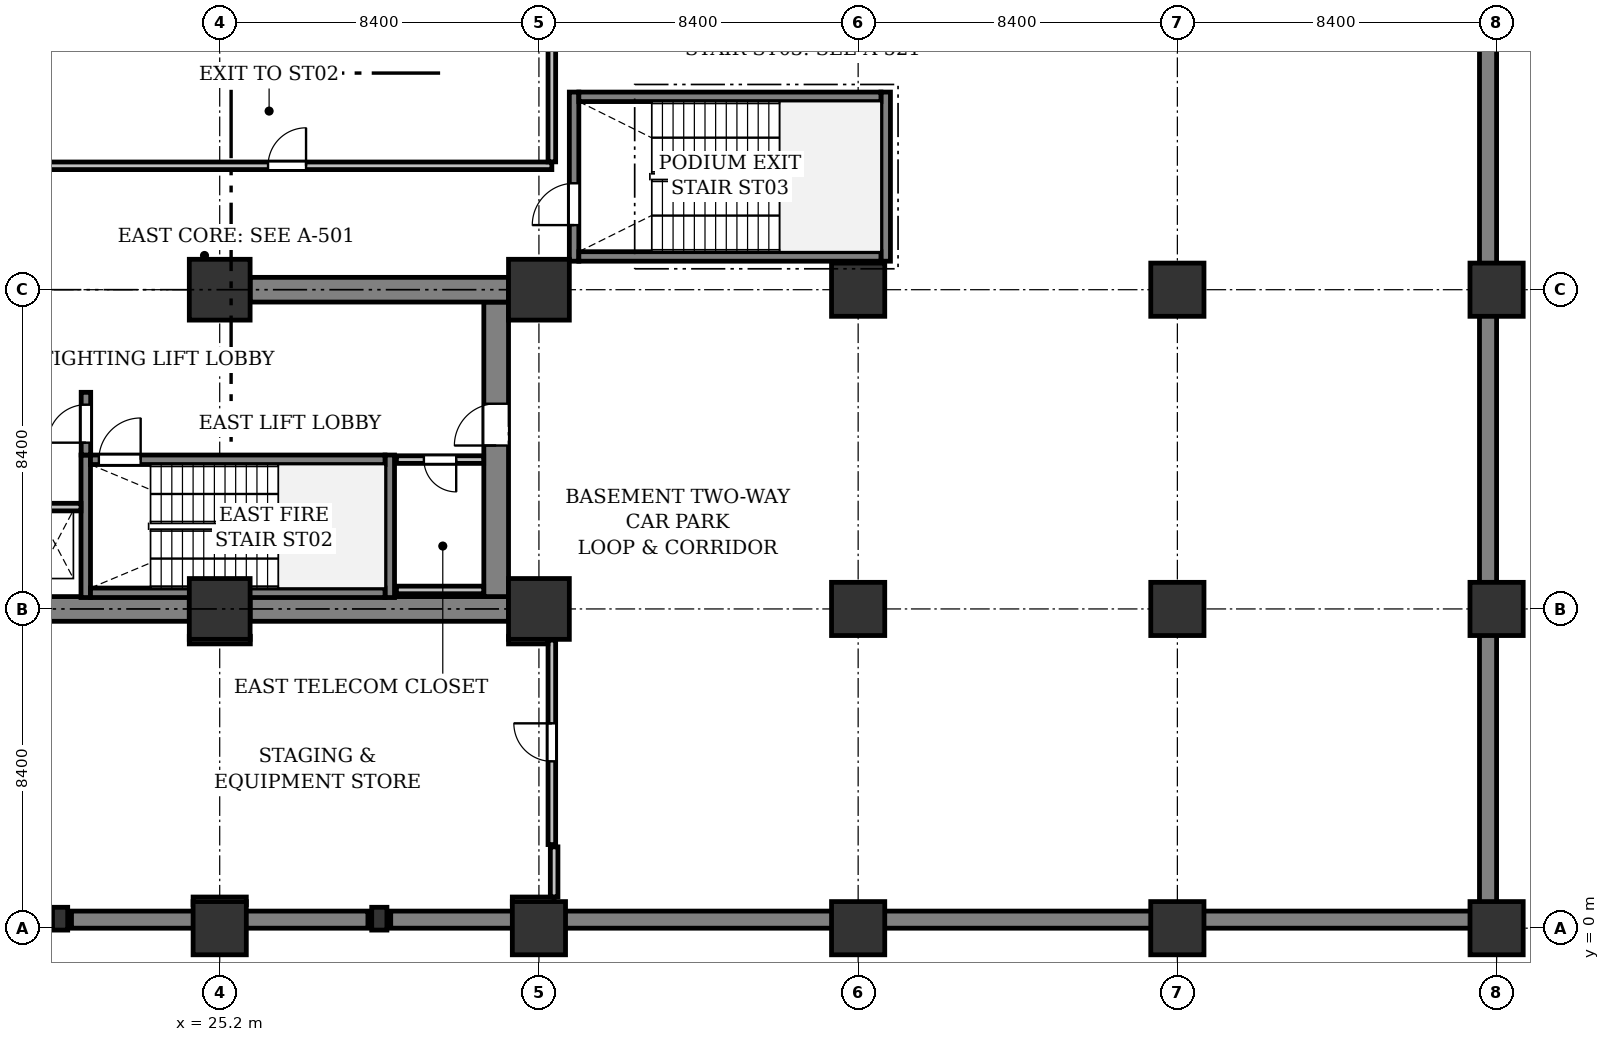
"""IFC4 building model, lengths in metres.
Left out: names, types, materials, properties, quantities, classifications, styles, units other than length and angle.
Written with IfcOpenShell. Run it as: python <this file> out.ifc"""

import sys

from ifc_helpers import new_model, si_unit, direction, frame, frame_2d, origin, origin_2d, place, context, subcontext, project, spatial, rectangle, extrude, element, fill, save


model = new_model("IFC4")
c1 = context("Model", 3, precision=1e-05, world=origin(), true_north=direction((0.0, 1.0)))
c2 = subcontext(c1, "Body", "Model", "MODEL_VIEW")
j1 = project(units=[si_unit("LENGTHUNIT", "METRE"), si_unit("PLANEANGLEUNIT", "RADIAN")], contexts=[c1])
p1 = place(None, origin())
s1 = spatial("IfcSite", under=j1, at=p1, CompositionType="ELEMENT")
p2 = place(p1, origin())
s2 = spatial("IfcBuilding", under=s1, at=p2, CompositionType="ELEMENT")
p3 = place(p2, frame((0.0, 0.0, -9.6)))
s3 = spatial("IfcBuildingStorey", under=s2, at=p3, CompositionType="ELEMENT", Elevation=-9.6)
p4 = place(p3, frame((21.3, 0.225, 0.0), z_axis=(0.0, 0.0, 1.0), x_axis=(1.0, 0.0, 0.0)))
e1 = element("IfcWall", 1, at=p4, inside=s3, PredefinedType="SOLIDWALL", context=c2, shape_type="SweptSolid", body=[
    extrude(rectangle(XDim=7.8, YDim=0.45, at=frame_2d((3.9, 0.0))), origin(), (0.0, 0.0, 1.0), 4.48),
])
p5 = place(p3, frame((29.7, 0.225, 0.0), z_axis=(0.0, 0.0, 1.0), x_axis=(1.0, 0.0, 0.0)))
e2 = element("IfcWall", 2, at=p5, inside=s3, PredefinedType="SOLIDWALL", context=c2, shape_type="SweptSolid", body=[
    extrude(rectangle(XDim=29.1, YDim=0.45, at=frame_2d((14.55, 0.0))), origin(), (0.0, 0.0, 1.0), 4.48),
])
p6 = place(p3, frame((58.575, 0.45, 0.0), z_axis=(0.0, 0.0, 1.0), x_axis=(0.0, 1.0, 0.0)))
e3 = element("IfcWall", 3, at=p6, inside=s3, PredefinedType="SOLIDWALL", context=c2, shape_type="SweptSolid", body=[
    extrude(rectangle(XDim=49.5, YDim=0.45, at=frame_2d((24.75, 0.0))), origin(), (0.0, 0.0, 1.0), 4.48),
])
p7 = place(p3, frame((25.2, 0.0, 0.0), z_axis=(0.0, 0.0, 1.0), x_axis=(1.0, 0.0, 0.0)))
e4 = element("IfcColumn", 4, at=p7, inside=s3, PredefinedType="COLUMN", context=c2, shape_type="SweptSolid", body=[
    extrude(rectangle(XDim=1.4, YDim=1.4, at=origin_2d()), origin(), (0.0, 0.0, 1.0), 4.8),
])
for number, where, z_axis, x_axis in (
    (5, (25.2, 8.4, 0.0), (0.0, 0.0, 1.0), (1.0, 0.0, 0.0)),
    (6, (25.2, 16.8, 0.0), (0.0, 0.0, 1.0), (1.0, 0.0, 0.0)),
):
    element("IfcColumn", number, at=place(p3, frame(where, z_axis=z_axis, x_axis=x_axis)), inside=s3, PredefinedType="COLUMN", context=c2, shape_type="SweptSolid", body=[
        extrude(rectangle(XDim=1.6, YDim=1.6, at=origin_2d()), origin(), (0.0, 0.0, 1.0), 4.8),
    ])
p8 = place(p3, frame((33.6, 0.0, 0.0), z_axis=(0.0, 0.0, 1.0), x_axis=(1.0, 0.0, 0.0)))
e7 = element("IfcColumn", 7, at=p8, inside=s3, PredefinedType="COLUMN", context=c2, shape_type="SweptSolid", body=[
    extrude(rectangle(XDim=1.4, YDim=1.4, at=origin_2d()), origin(), (0.0, 0.0, 1.0), 4.8),
])
for number, where, z_axis, x_axis in (
    (8, (33.6, 8.4, 0.0), (0.0, 0.0, 1.0), (1.0, 0.0, 0.0)),
    (9, (33.6, 16.8, 0.0), (0.0, 0.0, 1.0), (1.0, 0.0, 0.0)),
):
    element("IfcColumn", number, at=place(p3, frame(where, z_axis=z_axis, x_axis=x_axis)), inside=s3, PredefinedType="COLUMN", context=c2, shape_type="SweptSolid", body=[
        extrude(rectangle(XDim=1.6, YDim=1.6, at=origin_2d()), origin(), (0.0, 0.0, 1.0), 4.8),
    ])
for number, where, z_axis, x_axis in (
    (10, (42.0, 0.0, 0.0), (0.0, 0.0, 1.0), (1.0, 0.0, 0.0)),
    (11, (42.0, 8.4, 0.0), (0.0, 0.0, 1.0), (1.0, 0.0, 0.0)),
    (12, (42.0, 16.8, 0.0), (0.0, 0.0, 1.0), (1.0, 0.0, 0.0)),
    (13, (50.4, 0.0, 0.0), (0.0, 0.0, 1.0), (1.0, 0.0, 0.0)),
    (14, (50.4, 8.4, 0.0), (0.0, 0.0, 1.0), (1.0, 0.0, 0.0)),
    (15, (50.4, 16.8, 0.0), (0.0, 0.0, 1.0), (1.0, 0.0, 0.0)),
    (16, (58.8, 0.0, 0.0), (0.0, 0.0, 1.0), (1.0, 0.0, 0.0)),
    (17, (58.8, 8.4, 0.0), (0.0, 0.0, 1.0), (1.0, 0.0, 0.0)),
    (18, (58.8, 16.8, 0.0), (0.0, 0.0, 1.0), (1.0, 0.0, 0.0)),
):
    element("IfcColumn", number, at=place(p3, frame(where, z_axis=z_axis, x_axis=x_axis)), inside=s3, PredefinedType="COLUMN", context=c2, shape_type="SweptSolid", body=[
        extrude(rectangle(XDim=1.4, YDim=1.4, at=origin_2d()), origin(), (0.0, 0.0, 1.0), 4.8),
    ])
for number, where, z_axis, x_axis in (
    (19, (21.0, 0.25, 0.0), (0.0, 0.0, 1.0), (1.0, 0.0, 0.0)),
    (20, (29.4, 0.25, 0.0), (0.0, 0.0, 1.0), (1.0, 0.0, 0.0)),
):
    element("IfcColumn", number, at=place(p3, frame(where, z_axis=z_axis, x_axis=x_axis)), inside=s3, PredefinedType="PILASTER", context=c2, shape_type="SweptSolid", body=[
        extrude(rectangle(XDim=0.4, YDim=0.6, at=origin_2d()), origin(), (0.0, 0.0, 1.0), 4.8),
    ])
p9 = place(p3, frame((17.6, 8.4, 0.0), z_axis=(0.0, 0.0, 1.0), x_axis=(1.0, 0.0, 0.0)))
e21 = element("IfcWall", 21, at=p9, inside=s3, PredefinedType="SHEAR", context=c2, shape_type="SweptSolid", body=[
    extrude(rectangle(XDim=6.8, YDim=0.65, at=frame_2d((3.4, 0.0))), origin(), (0.0, 0.0, 1.0), 4.48),
])
p10 = place(p3, frame((26.0, 8.4, 0.0), z_axis=(0.0, 0.0, 1.0), x_axis=(1.0, 0.0, 0.0)))
e22 = element("IfcWall", 22, at=p10, inside=s3, PredefinedType="SHEAR", context=c2, shape_type="SweptSolid", body=[
    extrude(rectangle(XDim=6.8, YDim=0.65, at=frame_2d((3.4, 0.0))), origin(), (0.0, 0.0, 1.0), 4.48),
])
p11 = place(p3, frame((32.475, 8.725, 0.0), z_axis=(0.0, 0.0, 1.0), x_axis=(0.0, 1.0, 0.0)))
e23 = element("IfcWall", 23, at=p11, inside=s3, PredefinedType="SHEAR", context=c2, shape_type="SweptSolid", body=[
    extrude(rectangle(XDim=7.75, YDim=0.65, at=frame_2d((3.875, 0.0))), origin(), (0.0, 0.0, 1.0), 4.48),
])
p12 = place(p11, frame((3.975, 0.0, 0.0)))
e24 = element("IfcOpeningElement", 24, at=p12, cuts=e23, PredefinedType="OPENING", context=c2, shape_type="SweptSolid", body=[
    extrude(rectangle(XDim=1.1, YDim=2.15, at=frame_2d((0.55, 1.075))), frame((0.0, 0.335, 0.0), z_axis=(0.0, -1.0, 0.0), x_axis=(1.0, 0.0, 0.0)), (0.0, 0.0, 1.0), 0.67),
])
p13 = place(p3, frame((26.0, 16.8, 0.0), z_axis=(0.0, 0.0, 1.0), x_axis=(1.0, 0.0, 0.0)))
e25 = element("IfcWall", 25, at=p13, inside=s3, PredefinedType="SHEAR", context=c2, shape_type="SweptSolid", body=[
    extrude(rectangle(XDim=6.8, YDim=0.65, at=frame_2d((3.4, 0.0))), origin(), (0.0, 0.0, 1.0), 4.48),
])
for number, where, z_axis, x_axis in (
    (26, (21.675, 8.7, 0.0), (0.0, 0.0, 1.0), (0.0, 1.0, 0.0)),
    (27, (29.675, 8.7, 0.0), (0.0, 0.0, 1.0), (0.0, 1.0, 0.0)),
):
    element("IfcWall", number, at=place(p3, frame(where, z_axis=z_axis, x_axis=x_axis)), inside=s3, PredefinedType="SHEAR", context=c2, shape_type="SweptSolid", body=[
        extrude(rectangle(XDim=3.75, YDim=0.25, at=frame_2d((1.875, 0.0))), origin(), (0.0, 0.0, 1.0), 4.48),
    ])
p14 = place(p3, frame((21.8, 8.825, 0.0), z_axis=(0.0, 0.0, 1.0), x_axis=(1.0, 0.0, 0.0)))
e28 = element("IfcWall", 28, at=p14, inside=s3, PredefinedType="SHEAR", context=c2, shape_type="SweptSolid", body=[
    extrude(rectangle(XDim=7.75, YDim=0.25, at=frame_2d((3.875, 0.0))), origin(), (0.0, 0.0, 1.0), 4.48),
])
p15 = place(p3, frame((21.8, 12.325, 0.0), z_axis=(0.0, 0.0, 1.0), x_axis=(1.0, 0.0, 0.0)))
e29 = element("IfcWall", 29, at=p15, inside=s3, PredefinedType="SHEAR", context=c2, shape_type="SweptSolid", body=[
    extrude(rectangle(XDim=7.75, YDim=0.25, at=frame_2d((3.875, 0.0))), origin(), (0.0, 0.0, 1.0), 4.48),
])
p16 = place(p15, frame((0.22, 0.0, 0.0)))
e30 = element("IfcOpeningElement", 30, at=p16, cuts=e29, PredefinedType="OPENING", context=c2, shape_type="SweptSolid", body=[
    extrude(rectangle(XDim=1.1, YDim=2.15, at=frame_2d((0.55, 1.075))), frame((0.0, 0.135, 0.0), z_axis=(0.0, -1.0, 0.0), x_axis=(1.0, 0.0, 0.0)), (0.0, 0.0, 1.0), 0.27),
])
p17 = place(p3, frame((34.525, 17.55, 0.0), z_axis=(0.0, 0.0, 1.0), x_axis=(0.0, 1.0, 0.0)))
e31 = element("IfcWall", 31, at=p17, inside=s3, PredefinedType="SHEAR", context=c2, shape_type="SweptSolid", body=[
    extrude(rectangle(XDim=4.45, YDim=0.25, at=frame_2d((2.225, 0.0))), origin(), (0.0, 0.0, 1.0), 4.48),
])
p18 = place(p17, frame((0.95, 0.0, 0.0)))
e32 = element("IfcOpeningElement", 32, at=p18, cuts=e31, PredefinedType="OPENING", context=c2, shape_type="SweptSolid", body=[
    extrude(rectangle(XDim=1.1, YDim=2.15, at=frame_2d((0.55, 1.075))), frame((0.0, 0.135, 0.0), z_axis=(0.0, -1.0, 0.0), x_axis=(1.0, 0.0, 0.0)), (0.0, 0.0, 1.0), 0.27),
])
p19 = place(p3, frame((42.725, 17.55, 0.0), z_axis=(0.0, 0.0, 1.0), x_axis=(0.0, 1.0, 0.0)))
e33 = element("IfcWall", 33, at=p19, inside=s3, PredefinedType="SHEAR", context=c2, shape_type="SweptSolid", body=[
    extrude(rectangle(XDim=4.45, YDim=0.25, at=frame_2d((2.225, 0.0))), origin(), (0.0, 0.0, 1.0), 4.48),
])
for number, where, z_axis, x_axis in (
    (34, (34.65, 17.675, 0.0), (0.0, 0.0, 1.0), (1.0, 0.0, 0.0)),
    (35, (34.65, 21.875, 0.0), (0.0, 0.0, 1.0), (1.0, 0.0, 0.0)),
):
    element("IfcWall", number, at=place(p3, frame(where, z_axis=z_axis, x_axis=x_axis)), inside=s3, PredefinedType="SHEAR", context=c2, shape_type="SweptSolid", body=[
        extrude(rectangle(XDim=7.95, YDim=0.25, at=frame_2d((3.975, 0.0))), origin(), (0.0, 0.0, 1.0), 4.48),
    ])
p20 = place(p3, frame((20.2, 11.08, 0.0), z_axis=(0.0, 0.0, 1.0), x_axis=(1.0, 0.0, 0.0)))
e36 = element("IfcWall", 36, at=p20, inside=s3, PredefinedType="PARTITIONING", context=c2, shape_type="SweptSolid", body=[
    extrude(rectangle(XDim=1.35, YDim=0.2, at=frame_2d((0.675, 0.0))), origin(), (0.0, 0.0, 1.0), 4.48),
])
p21 = place(p3, frame((21.68, 12.45, 0.0), z_axis=(0.0, 0.0, 1.0), x_axis=(0.0, 1.0, 0.0)))
e37 = element("IfcWall", 37, at=p21, inside=s3, PredefinedType="SHEAR", context=c2, shape_type="SweptSolid", body=[
    extrude(rectangle(XDim=1.65, YDim=0.25, at=frame_2d((0.825, 0.0))), origin(), (0.0, 0.0, 1.0), 4.48),
])
p22 = place(p21, frame((0.325, 0.0, 0.0)))
e38 = element("IfcOpeningElement", 38, at=p22, cuts=e37, PredefinedType="OPENING", context=c2, shape_type="SweptSolid", body=[
    extrude(rectangle(XDim=1.0, YDim=2.15, at=frame_2d((0.5, 1.075))), frame((0.0, 0.135, 0.0), z_axis=(0.0, -1.0, 0.0), x_axis=(1.0, 0.0, 0.0)), (0.0, 0.0, 1.0), 0.27),
])
p23 = place(p3, frame((32.146, 12.33, 0.0), z_axis=(0.0, 0.0, 1.0), x_axis=(-1.0, 0.0, 0.0)))
e39 = element("IfcWall", 39, at=p23, inside=s3, PredefinedType="PARTITIONING", context=c2, shape_type="SweptSolid", body=[
    extrude(rectangle(XDim=2.296, YDim=0.2, at=frame_2d((1.148, 0.0))), origin(), (0.0, 0.0, 1.0), 4.48),
])
p24 = place(p23, frame((0.723, 0.0, 0.0)))
e40 = element("IfcOpeningElement", 40, at=p24, cuts=e39, PredefinedType="OPENING", context=c2, shape_type="SweptSolid", body=[
    extrude(rectangle(XDim=0.85, YDim=2.15, at=frame_2d((0.425, 1.075))), frame((0.0, 0.11, 0.0), z_axis=(0.0, -1.0, 0.0), x_axis=(1.0, 0.0, 0.0)), (0.0, 0.0, 1.0), 0.22),
])
p25 = place(p3, frame((29.85, 8.9, 0.0), z_axis=(0.0, 0.0, 1.0), x_axis=(1.0, 0.0, 0.0)))
e41 = element("IfcWall", 41, at=p25, inside=s3, PredefinedType="PARTITIONING", context=c2, shape_type="SweptSolid", body=[
    extrude(rectangle(XDim=2.296, YDim=0.2, at=frame_2d((1.148, 0.0))), origin(), (0.0, 0.0, 1.0), 4.48),
])
p26 = place(p3, frame((41.3, 0.72, 0.0), z_axis=(0.0, 0.0, 1.0), x_axis=(1.0, 0.0, 0.0)))
e42 = element("IfcWall", 42, at=p26, inside=s3, PredefinedType="PARTITIONING", context=c2, shape_type="SweptSolid", body=[
    extrude(rectangle(XDim=1.4, YDim=0.2, at=frame_2d((0.7, 0.0))), origin(), (0.0, 0.0, 1.0), 3.868),
])
p27 = place(p3, frame((49.7, 0.72, 0.0), z_axis=(0.0, 0.0, 1.0), x_axis=(1.0, 0.0, 0.0)))
e43 = element("IfcWall", 43, at=p27, inside=s3, PredefinedType="PARTITIONING", context=c2, shape_type="SweptSolid", body=[
    extrude(rectangle(XDim=1.4, YDim=0.2, at=frame_2d((0.7, 0.0))), origin(), (0.0, 0.0, 1.0), 3.868),
])
p28 = place(p3, frame((58.08, 7.7, 0.0), z_axis=(0.0, 0.0, 1.0), x_axis=(0.0, 1.0, 0.0)))
e44 = element("IfcWall", 44, at=p28, inside=s3, PredefinedType="PARTITIONING", context=c2, shape_type="SweptSolid", body=[
    extrude(rectangle(XDim=1.4, YDim=0.2, at=frame_2d((0.7, 0.0))), origin(), (0.0, 0.0, 1.0), 3.78),
])
p29 = place(p3, frame((58.08, 16.1, 0.0), z_axis=(0.0, 0.0, 1.0), x_axis=(0.0, 1.0, 0.0)))
e45 = element("IfcWall", 45, at=p29, inside=s3, PredefinedType="PARTITIONING", context=c2, shape_type="SweptSolid", body=[
    extrude(rectangle(XDim=1.4, YDim=0.2, at=frame_2d((0.7, 0.0))), origin(), (0.0, 0.0, 1.0), 3.78),
])
p30 = place(p3, frame((58.346, 22.05, 0.0), z_axis=(0.0, 0.0, 1.0), x_axis=(-1.0, 0.0, 0.0)))
e46 = element("IfcWall", 46, at=p30, inside=s3, PredefinedType="PARTITIONING", context=c2, shape_type="SweptSolid", body=[
    extrude(rectangle(XDim=11.513, YDim=0.2, at=frame_2d((5.756, 0.0))), origin(), (0.0, 0.0, 1.0), 3.868),
])
p31 = place(p3, frame((46.8, 22.04, 0.0), z_axis=(0.0, 0.0, 1.0), x_axis=(-1.0, 0.0, 0.0)))
e47 = element("IfcWall", 47, at=p31, inside=s3, PredefinedType="PARTITIONING", context=c2, shape_type="SweptSolid", body=[
    extrude(rectangle(XDim=4.2, YDim=0.2, at=frame_2d((2.1, 0.0))), origin(), (0.0, 0.0, 1.0), 4.074),
])
p32 = place(p3, frame((36.7, 17.546, 0.0), z_axis=(0.0, 0.0, 1.0), x_axis=(0.0, -1.0, 0.0)))
e48 = element("IfcWall", 48, at=p32, inside=s3, PredefinedType="PARTITIONING", context=c2, shape_type="SweptSolid", body=[
    extrude(rectangle(XDim=3.286, YDim=0.2, at=frame_2d((1.643, 0.0))), origin(), (0.0, 0.0, 1.0), 3.78),
])
p33 = place(p3, frame((36.76, 14.2, 0.0), z_axis=(0.0, 0.0, 1.0), x_axis=(0.0, -1.0, 0.0)))
e49 = element("IfcWall", 49, at=p33, inside=s3, PredefinedType="PARTITIONING", context=c2, shape_type="SweptSolid", body=[
    extrude(rectangle(XDim=8.9, YDim=0.2, at=frame_2d((4.45, 0.0))), origin(), (0.0, 0.0, 1.0), 3.78),
])
p34 = place(p33, frame((3.95, 0.0, 0.0)))
e50 = element("IfcOpeningElement", 50, at=p34, cuts=e49, PredefinedType="OPENING", context=c2, shape_type="SweptSolid", body=[
    extrude(rectangle(XDim=1.0, YDim=2.15, at=frame_2d((0.5, 1.075))), frame((0.0, 0.11, 0.0), z_axis=(0.0, -1.0, 0.0), x_axis=(1.0, 0.0, 0.0)), (0.0, 0.0, 1.0), 0.22),
])
p35 = place(p3, frame((36.7, 5.24, 0.0), z_axis=(0.0, 0.0, 1.0), x_axis=(0.0, -1.0, 0.0)))
e51 = element("IfcWall", 51, at=p35, inside=s3, PredefinedType="PARTITIONING", context=c2, shape_type="SweptSolid", body=[
    extrude(rectangle(XDim=4.786, YDim=0.2, at=frame_2d((2.393, 0.0))), origin(), (0.0, 0.0, 1.0), 4.48),
])
p36 = place(p3, frame((46.86, 24.35, 0.0), z_axis=(0.0, 0.0, 1.0), x_axis=(0.0, -1.0, 0.0)))
e52 = element("IfcWall", 52, at=p36, inside=s3, PredefinedType="PARTITIONING", context=c2, shape_type="SweptSolid", body=[
    extrude(rectangle(XDim=2.196, YDim=0.2, at=frame_2d((1.098, 0.0))), origin(), (0.0, 0.0, 1.0), 4.48),
])
p37 = place(p12, origin())
e53 = element("IfcDoor", 53, at=p37, inside=s3, OperationType="SINGLE_SWING_LEFT", PredefinedType="DOOR", context=c2, shape_type="SweptSolid", body=[
    extrude(rectangle(XDim=1.1, YDim=2.15, at=frame_2d((0.55, 1.075))), frame((0.0, 0.025, 0.0), z_axis=(0.0, -1.0, 0.0), x_axis=(1.0, 0.0, 0.0)), (0.0, 0.0, 1.0), 0.05),
])
fill(e24, e53)
p38 = place(p16, origin())
e54 = element("IfcDoor", 54, at=p38, inside=s3, OperationType="SINGLE_SWING_RIGHT", PredefinedType="DOOR", context=c2, shape_type="SweptSolid", body=[
    extrude(rectangle(XDim=1.1, YDim=2.15, at=frame_2d((0.55, 1.075))), frame((0.0, 0.025, 0.0), z_axis=(0.0, -1.0, 0.0), x_axis=(1.0, 0.0, 0.0)), (0.0, 0.0, 1.0), 0.05),
])
fill(e30, e54)
p39 = place(p18, origin())
e55 = element("IfcDoor", 55, at=p39, inside=s3, OperationType="SINGLE_SWING_LEFT", PredefinedType="DOOR", context=c2, shape_type="SweptSolid", body=[
    extrude(rectangle(XDim=1.1, YDim=2.15, at=frame_2d((0.55, 1.075))), frame((0.0, 0.025, 0.0), z_axis=(0.0, -1.0, 0.0), x_axis=(1.0, 0.0, 0.0)), (0.0, 0.0, 1.0), 0.05),
])
fill(e32, e55)
p40 = place(p22, origin())
e56 = element("IfcDoor", 56, at=p40, inside=s3, OperationType="SINGLE_SWING_LEFT", PredefinedType="DOOR", context=c2, shape_type="SweptSolid", body=[
    extrude(rectangle(XDim=1.0, YDim=2.15, at=frame_2d((0.5, 1.075))), frame((0.0, 0.025, 0.0), z_axis=(0.0, -1.0, 0.0), x_axis=(1.0, 0.0, 0.0)), (0.0, 0.0, 1.0), 0.05),
])
fill(e38, e56)
p41 = place(p24, origin())
e57 = element("IfcDoor", 57, at=p41, inside=s3, OperationType="SINGLE_SWING_LEFT", PredefinedType="DOOR", context=c2, shape_type="SweptSolid", body=[
    extrude(rectangle(XDim=0.85, YDim=2.15, at=frame_2d((0.425, 1.075))), frame((0.0, 0.025, 0.0), z_axis=(0.0, -1.0, 0.0), x_axis=(1.0, 0.0, 0.0)), (0.0, 0.0, 1.0), 0.05),
])
fill(e40, e57)
p42 = place(p34, origin())
e58 = element("IfcDoor", 58, at=p42, inside=s3, OperationType="SINGLE_SWING_LEFT", PredefinedType="DOOR", context=c2, shape_type="SweptSolid", body=[
    extrude(rectangle(XDim=1.0, YDim=2.15, at=frame_2d((0.5, 1.075))), frame((0.0, 0.025, 0.0), z_axis=(0.0, -1.0, 0.0), x_axis=(1.0, 0.0, 0.0)), (0.0, 0.0, 1.0), 0.05),
])
fill(e50, e58)
save(model, sys.argv[1])
